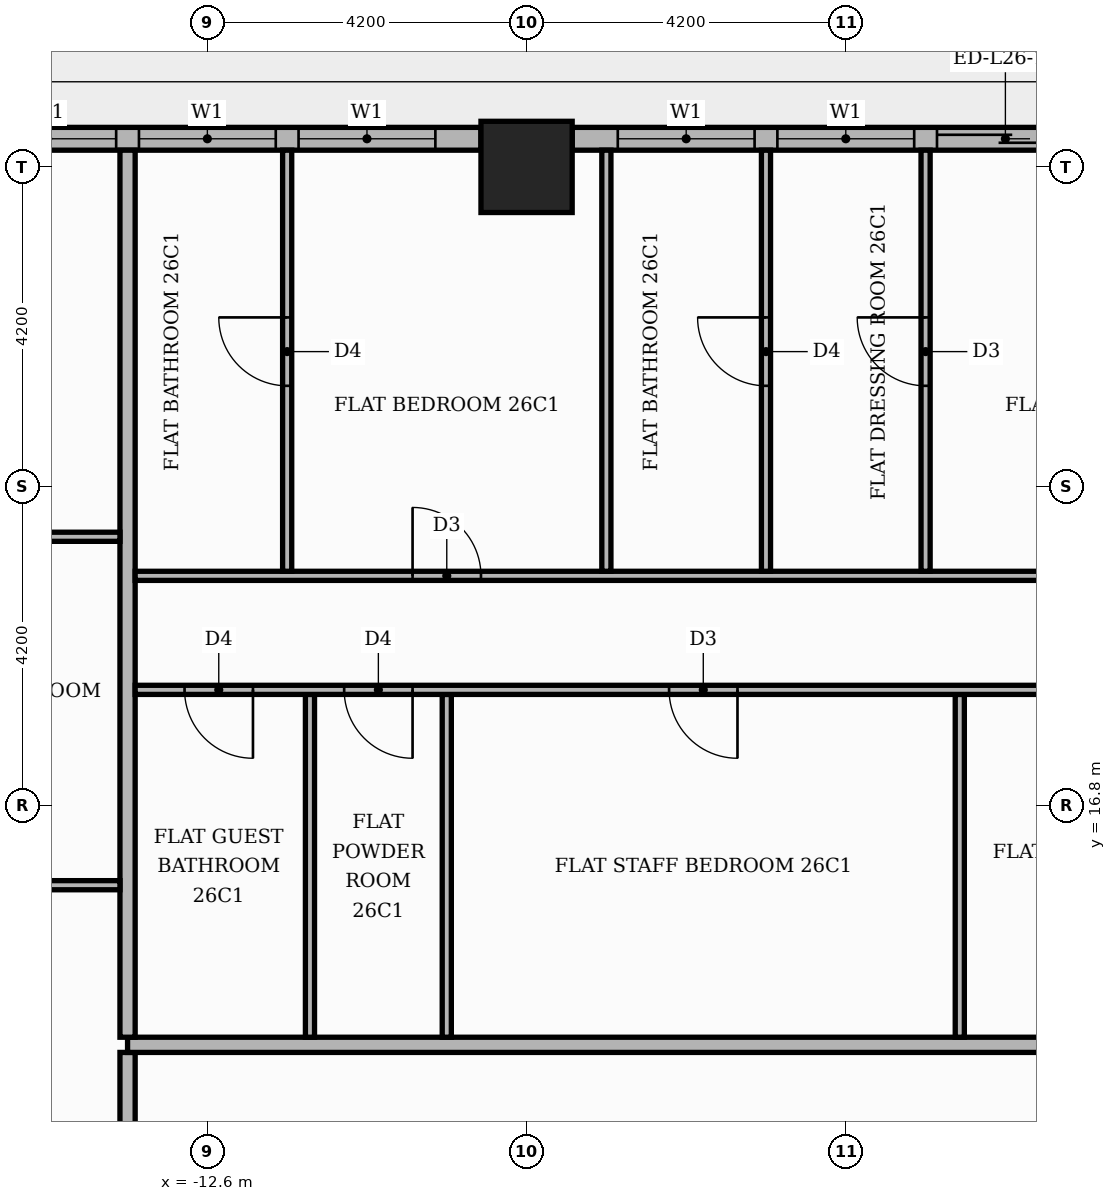
"""IFC4 building model, lengths in metres.
Left out: names, types, materials, properties, quantities, classifications, styles, units other than length and angle.
Written with IfcOpenShell. Run it as: python <this file> out.ifc"""

import sys

from ifc_helpers import new_model, si_unit, direction, frame, frame_2d, origin, origin_2d, place, context, subcontext, project, spatial, rectangle, extrude, element, fill, save


model = new_model("IFC4")
c1 = context("Model", 3, precision=1e-05, world=origin(), true_north=direction((0.0, 1.0)))
c2 = subcontext(c1, "Body", "Model", "MODEL_VIEW")
j1 = project(units=[si_unit("LENGTHUNIT", "METRE"), si_unit("PLANEANGLEUNIT", "RADIAN")], contexts=[c1])
p1 = place(None, origin())
s1 = spatial("IfcSite", under=j1, at=p1, CompositionType="ELEMENT")
p2 = place(p1, origin())
s2 = spatial("IfcBuilding", under=s1, at=p2, CompositionType="ELEMENT")
p3 = place(p2, frame((0.0, 0.0, 110.4)))
s3 = spatial("IfcBuildingStorey", under=s2, at=p3, CompositionType="ELEMENT", Elevation=110.4)
p4 = place(p3, frame((-8.4, 25.2, 0.0), z_axis=(0.0, 0.0, 1.0), x_axis=(1.0, 0.0, 0.0)))
e1 = element("IfcColumn", 1, at=p4, inside=s3, PredefinedType="COLUMN", context=c2, shape_type="SweptSolid", body=[
    extrude(rectangle(XDim=1.2, YDim=1.2, at=origin_2d()), origin(), (0.0, 0.0, 1.0), 3.9),
])
p5 = place(p3, frame((-0.6, 25.57, 0.0), z_axis=(0.0, 0.0, 1.0), x_axis=(-1.0, 0.0, 0.0)))
e2 = element("IfcWall", 2, at=p5, inside=s3, PredefinedType="STANDARD", context=c2, shape_type="SweptSolid", body=[
    extrude(rectangle(XDim=7.2, YDim=0.3, at=frame_2d((3.6, 0.0))), origin(), (0.0, 0.0, 1.0), 3.48),
])
p6 = place(p5, frame((0.6, 0.0, 0.0)))
e3 = element("IfcOpeningElement", 3, at=p6, cuts=e2, PredefinedType="OPENING", context=c2, shape_type="SweptSolid", body=[
    extrude(rectangle(XDim=1.8, YDim=2.4, at=frame_2d((0.9, 1.2))), frame((0.0, 0.16, 0.0), z_axis=(0.0, -1.0, 0.0), x_axis=(1.0, 0.0, 0.0)), (0.0, 0.0, 1.0), 0.32),
])
p7 = place(p5, frame((2.7, 0.0, 0.9)))
e4 = element("IfcOpeningElement", 4, at=p7, cuts=e2, PredefinedType="OPENING", context=c2, shape_type="SweptSolid", body=[
    extrude(rectangle(XDim=1.8, YDim=2.1, at=frame_2d((0.9, 1.05))), frame((0.0, 0.16, 0.0), z_axis=(0.0, -1.0, 0.0), x_axis=(1.0, 0.0, 0.0)), (0.0, 0.0, 1.0), 0.32),
])
p8 = place(p5, frame((4.8, 0.0, 0.9)))
e5 = element("IfcOpeningElement", 5, at=p8, cuts=e2, PredefinedType="OPENING", context=c2, shape_type="SweptSolid", body=[
    extrude(rectangle(XDim=1.8, YDim=2.1, at=frame_2d((0.9, 1.05))), frame((0.0, 0.16, 0.0), z_axis=(0.0, -1.0, 0.0), x_axis=(1.0, 0.0, 0.0)), (0.0, 0.0, 1.0), 0.32),
])
p9 = place(p3, frame((-9.0, 25.57, 0.0), z_axis=(0.0, 0.0, 1.0), x_axis=(-1.0, 0.0, 0.0)))
e6 = element("IfcWall", 6, at=p9, inside=s3, PredefinedType="STANDARD", context=c2, shape_type="SweptSolid", body=[
    extrude(rectangle(XDim=7.2, YDim=0.3, at=frame_2d((3.6, 0.0))), origin(), (0.0, 0.0, 1.0), 3.48),
])
p10 = place(p9, frame((0.6, 0.0, 0.9)))
e7 = element("IfcOpeningElement", 7, at=p10, cuts=e6, PredefinedType="OPENING", context=c2, shape_type="SweptSolid", body=[
    extrude(rectangle(XDim=1.8, YDim=2.1, at=frame_2d((0.9, 1.05))), frame((0.0, 0.16, 0.0), z_axis=(0.0, -1.0, 0.0), x_axis=(1.0, 0.0, 0.0)), (0.0, 0.0, 1.0), 0.32),
])
p11 = place(p9, frame((2.7, 0.0, 0.9)))
e8 = element("IfcOpeningElement", 8, at=p11, cuts=e6, PredefinedType="OPENING", context=c2, shape_type="SweptSolid", body=[
    extrude(rectangle(XDim=1.8, YDim=2.1, at=frame_2d((0.9, 1.05))), frame((0.0, 0.16, 0.0), z_axis=(0.0, -1.0, 0.0), x_axis=(1.0, 0.0, 0.0)), (0.0, 0.0, 1.0), 0.32),
])
p12 = place(p9, frame((4.8, 0.0, 0.9)))
e9 = element("IfcOpeningElement", 9, at=p12, cuts=e6, PredefinedType="OPENING", context=c2, shape_type="SweptSolid", body=[
    extrude(rectangle(XDim=1.8, YDim=2.1, at=frame_2d((0.9, 1.05))), frame((0.0, 0.16, 0.0), z_axis=(0.0, -1.0, 0.0), x_axis=(1.0, 0.0, 0.0)), (0.0, 0.0, 1.0), 0.32),
])
p13 = place(p3, frame((-13.65, 5.35, 0.0), z_axis=(0.0, 0.0, 1.0), x_axis=(0.0, 1.0, 0.0)))
e10 = element("IfcWall", 10, at=p13, inside=s3, PredefinedType="PARTITIONING", context=c2, shape_type="SweptSolid", body=[
    extrude(rectangle(XDim=8.2, YDim=0.2, at=frame_2d((4.1, 0.0))), origin(), (0.0, 0.0, 1.0), 3.48),
])
p14 = place(p13, frame((5.65, 0.0, 0.0)))
e11 = element("IfcOpeningElement", 11, at=p14, cuts=e10, PredefinedType="OPENING", context=c2, shape_type="SweptSolid", body=[
    extrude(rectangle(XDim=1.1, YDim=2.4, at=frame_2d((0.55, 1.2))), frame((0.0, 0.11, 0.0), z_axis=(0.0, -1.0, 0.0), x_axis=(1.0, 0.0, 0.0)), (0.0, 0.0, 1.0), 0.22),
])
p15 = place(p3, frame((-13.65, 13.65, 0.0), z_axis=(0.0, 0.0, 1.0), x_axis=(1.0, 0.0, 0.0)))
e12 = element("IfcWall", 12, at=p15, inside=s3, PredefinedType="PARTITIONING", context=c2, shape_type="SweptSolid", body=[
    extrude(rectangle(XDim=39.07, YDim=0.2, at=frame_2d((19.535, 0.0))), origin(), (0.0, 0.0, 1.0), 3.48),
])
p16 = place(p15, frame((23.6, 0.0, 0.0)))
e13 = element("IfcOpeningElement", 13, at=p16, cuts=e12, PredefinedType="OPENING", context=c2, shape_type="SweptSolid", body=[
    extrude(rectangle(XDim=1.1, YDim=2.4, at=frame_2d((0.55, 1.2))), frame((0.0, 0.11, 0.0), z_axis=(0.0, -1.0, 0.0), x_axis=(1.0, 0.0, 0.0)), (0.0, 0.0, 1.0), 0.22),
])
p17 = place(p3, frame((-13.65, 13.75, 0.0), z_axis=(0.0, 0.0, 1.0), x_axis=(0.0, 1.0, 0.0)))
e14 = element("IfcWall", 14, at=p17, inside=s3, PredefinedType="PARTITIONING", context=c2, shape_type="SweptSolid", body=[
    extrude(rectangle(XDim=11.67, YDim=0.2, at=frame_2d((5.835, 0.0))), origin(), (0.0, 0.0, 1.0), 3.48),
])
for number, where, z_axis, x_axis in (
    (15, (-11.25, 13.75, 0.0), (0.0, 0.0, 1.0), (0.0, 1.0, 0.0)),
    (16, (-9.45, 13.75, 0.0), (0.0, 0.0, 1.0), (0.0, 1.0, 0.0)),
    (17, (-2.7, 13.75, 0.0), (0.0, 0.0, 1.0), (0.0, 1.0, 0.0)),
):
    element("IfcWall", number, at=place(p3, frame(where, z_axis=z_axis, x_axis=x_axis)), inside=s3, PredefinedType="PARTITIONING", context=c2, shape_type="SweptSolid", body=[
        extrude(rectangle(XDim=4.51, YDim=0.12, at=frame_2d((2.255, 0.0))), origin(), (0.0, 0.0, 1.0), 3.48),
    ])
p18 = place(p3, frame((-20.72, 15.75, 0.0), z_axis=(0.0, 0.0, 1.0), x_axis=(1.0, 0.0, 0.0)))
e18 = element("IfcWall", 18, at=p18, inside=s3, PredefinedType="PARTITIONING", context=c2, shape_type="SweptSolid", body=[
    extrude(rectangle(XDim=6.97, YDim=0.12, at=frame_2d((3.485, 0.0))), origin(), (0.0, 0.0, 1.0), 3.48),
])
p19 = place(p18, frame((3.035, 0.0, 0.0)))
e19 = element("IfcOpeningElement", 19, at=p19, cuts=e18, PredefinedType="OPENING", context=c2, shape_type="SweptSolid", body=[
    extrude(rectangle(XDim=1.0, YDim=2.1, at=frame_2d((0.5, 1.05))), frame((0.0, 0.07, 0.0), z_axis=(0.0, -1.0, 0.0), x_axis=(1.0, 0.0, 0.0)), (0.0, 0.0, 1.0), 0.14),
])
p20 = place(p3, frame((-13.55, 18.32, 0.0), z_axis=(0.0, 0.0, 1.0), x_axis=(1.0, 0.0, 0.0)))
e20 = element("IfcWall", 20, at=p20, inside=s3, PredefinedType="PARTITIONING", context=c2, shape_type="SweptSolid", body=[
    extrude(rectangle(XDim=20.9, YDim=0.12, at=frame_2d((10.45, 0.0))), origin(), (0.0, 0.0, 1.0), 3.48),
])
p21 = place(p20, frame((17.525, 0.0, 0.0)))
e21 = element("IfcOpeningElement", 21, at=p21, cuts=e20, PredefinedType="OPENING", context=c2, shape_type="SweptSolid", body=[
    extrude(rectangle(XDim=0.9, YDim=2.1, at=frame_2d((0.45, 1.05))), frame((0.0, 0.07, 0.0), z_axis=(0.0, -1.0, 0.0), x_axis=(1.0, 0.0, 0.0)), (0.0, 0.0, 1.0), 0.14),
])
p22 = place(p20, frame((12.5, 0.0, 0.0)))
e22 = element("IfcOpeningElement", 22, at=p22, cuts=e20, PredefinedType="OPENING", context=c2, shape_type="SweptSolid", body=[
    extrude(rectangle(XDim=0.9, YDim=2.1, at=frame_2d((0.45, 1.05))), frame((0.0, 0.07, 0.0), z_axis=(0.0, -1.0, 0.0), x_axis=(1.0, 0.0, 0.0)), (0.0, 0.0, 1.0), 0.14),
])
p23 = place(p20, frame((7.025, 0.0, 0.0)))
e23 = element("IfcOpeningElement", 23, at=p23, cuts=e20, PredefinedType="OPENING", context=c2, shape_type="SweptSolid", body=[
    extrude(rectangle(XDim=0.9, YDim=2.1, at=frame_2d((0.45, 1.05))), frame((0.0, 0.07, 0.0), z_axis=(0.0, -1.0, 0.0), x_axis=(1.0, 0.0, 0.0)), (0.0, 0.0, 1.0), 0.14),
])
p24 = place(p20, frame((2.75, 0.0, 0.0)))
e24 = element("IfcOpeningElement", 24, at=p24, cuts=e20, PredefinedType="OPENING", context=c2, shape_type="SweptSolid", body=[
    extrude(rectangle(XDim=0.9, YDim=2.1, at=frame_2d((0.45, 1.05))), frame((0.0, 0.07, 0.0), z_axis=(0.0, -1.0, 0.0), x_axis=(1.0, 0.0, 0.0)), (0.0, 0.0, 1.0), 0.14),
])
p25 = place(p20, frame((0.65, 0.0, 0.0)))
e25 = element("IfcOpeningElement", 25, at=p25, cuts=e20, PredefinedType="OPENING", context=c2, shape_type="SweptSolid", body=[
    extrude(rectangle(XDim=0.9, YDim=2.1, at=frame_2d((0.45, 1.05))), frame((0.0, 0.07, 0.0), z_axis=(0.0, -1.0, 0.0), x_axis=(1.0, 0.0, 0.0)), (0.0, 0.0, 1.0), 0.14),
])
p26 = place(p3, frame((-13.55, 19.82, 0.0), z_axis=(0.0, 0.0, 1.0), x_axis=(1.0, 0.0, 0.0)))
e26 = element("IfcWall", 26, at=p26, inside=s3, PredefinedType="PARTITIONING", context=c2, shape_type="SweptSolid", body=[
    extrude(rectangle(XDim=30.95, YDim=0.12, at=frame_2d((15.475, 0.0))), origin(), (0.0, 0.0, 1.0), 3.48),
])
p27 = place(p26, frame((25.65, 0.0, 0.0)))
e27 = element("IfcOpeningElement", 27, at=p27, cuts=e26, PredefinedType="OPENING", context=c2, shape_type="SweptSolid", body=[
    extrude(rectangle(XDim=1.0, YDim=2.1, at=frame_2d((0.5, 1.05))), frame((0.0, 0.07, 0.0), z_axis=(0.0, -1.0, 0.0), x_axis=(1.0, 0.0, 0.0)), (0.0, 0.0, 1.0), 0.14),
])
p28 = place(p26, frame((20.4, 0.0, 0.0)))
e28 = element("IfcOpeningElement", 28, at=p28, cuts=e26, PredefinedType="OPENING", context=c2, shape_type="SweptSolid", body=[
    extrude(rectangle(XDim=1.0, YDim=2.1, at=frame_2d((0.5, 1.05))), frame((0.0, 0.07, 0.0), z_axis=(0.0, -1.0, 0.0), x_axis=(1.0, 0.0, 0.0)), (0.0, 0.0, 1.0), 0.14),
])
p29 = place(p26, frame((13.1, 0.0, 0.0)))
e29 = element("IfcOpeningElement", 29, at=p29, cuts=e26, PredefinedType="OPENING", context=c2, shape_type="SweptSolid", body=[
    extrude(rectangle(XDim=0.9, YDim=2.1, at=frame_2d((0.45, 1.05))), frame((0.0, 0.07, 0.0), z_axis=(0.0, -1.0, 0.0), x_axis=(1.0, 0.0, 0.0)), (0.0, 0.0, 1.0), 0.14),
])
p30 = place(p26, frame((3.65, 0.0, 0.0)))
e30 = element("IfcOpeningElement", 30, at=p30, cuts=e26, PredefinedType="OPENING", context=c2, shape_type="SweptSolid", body=[
    extrude(rectangle(XDim=0.9, YDim=2.1, at=frame_2d((0.45, 1.05))), frame((0.0, 0.07, 0.0), z_axis=(0.0, -1.0, 0.0), x_axis=(1.0, 0.0, 0.0)), (0.0, 0.0, 1.0), 0.14),
])
p31 = place(p3, frame((-11.55, 19.88, 0.0), z_axis=(0.0, 0.0, 1.0), x_axis=(0.0, 1.0, 0.0)))
e31 = element("IfcWall", 31, at=p31, inside=s3, PredefinedType="PARTITIONING", context=c2, shape_type="SweptSolid", body=[
    extrude(rectangle(XDim=5.54, YDim=0.12, at=frame_2d((2.77, 0.0))), origin(), (0.0, 0.0, 1.0), 3.48),
])
p32 = place(p31, frame((2.44, 0.0, 0.0)))
e32 = element("IfcOpeningElement", 32, at=p32, cuts=e31, PredefinedType="OPENING", context=c2, shape_type="SweptSolid", body=[
    extrude(rectangle(XDim=0.9, YDim=2.1, at=frame_2d((0.45, 1.05))), frame((0.0, 0.07, 0.0), z_axis=(0.0, -1.0, 0.0), x_axis=(1.0, 0.0, 0.0)), (0.0, 0.0, 1.0), 0.14),
])
p33 = place(p3, frame((-7.35, 19.88, 0.0), z_axis=(0.0, 0.0, 1.0), x_axis=(0.0, 1.0, 0.0)))
e33 = element("IfcWall", 33, at=p33, inside=s3, PredefinedType="PARTITIONING", context=c2, shape_type="SweptSolid", body=[
    extrude(rectangle(XDim=5.54, YDim=0.12, at=frame_2d((2.77, 0.0))), origin(), (0.0, 0.0, 1.0), 3.48),
])
p34 = place(p3, frame((-5.25, 19.88, 0.0), z_axis=(0.0, 0.0, 1.0), x_axis=(0.0, 1.0, 0.0)))
e34 = element("IfcWall", 34, at=p34, inside=s3, PredefinedType="PARTITIONING", context=c2, shape_type="SweptSolid", body=[
    extrude(rectangle(XDim=5.54, YDim=0.12, at=frame_2d((2.77, 0.0))), origin(), (0.0, 0.0, 1.0), 3.48),
])
p35 = place(p34, frame((2.44, 0.0, 0.0)))
e35 = element("IfcOpeningElement", 35, at=p35, cuts=e34, PredefinedType="OPENING", context=c2, shape_type="SweptSolid", body=[
    extrude(rectangle(XDim=0.9, YDim=2.1, at=frame_2d((0.45, 1.05))), frame((0.0, 0.07, 0.0), z_axis=(0.0, -1.0, 0.0), x_axis=(1.0, 0.0, 0.0)), (0.0, 0.0, 1.0), 0.14),
])
p36 = place(p3, frame((-3.15, 19.88, 0.0), z_axis=(0.0, 0.0, 1.0), x_axis=(0.0, 1.0, 0.0)))
e36 = element("IfcWall", 36, at=p36, inside=s3, PredefinedType="PARTITIONING", context=c2, shape_type="SweptSolid", body=[
    extrude(rectangle(XDim=5.54, YDim=0.12, at=frame_2d((2.77, 0.0))), origin(), (0.0, 0.0, 1.0), 3.48),
])
p37 = place(p36, frame((2.44, 0.0, 0.0)))
e37 = element("IfcOpeningElement", 37, at=p37, cuts=e36, PredefinedType="OPENING", context=c2, shape_type="SweptSolid", body=[
    extrude(rectangle(XDim=0.9, YDim=2.1, at=frame_2d((0.45, 1.05))), frame((0.0, 0.07, 0.0), z_axis=(0.0, -1.0, 0.0), x_axis=(1.0, 0.0, 0.0)), (0.0, 0.0, 1.0), 0.14),
])
p38 = place(p3, frame((-20.72, 20.334, 0.0), z_axis=(0.0, 0.0, 1.0), x_axis=(1.0, 0.0, 0.0)))
e38 = element("IfcWall", 38, at=p38, inside=s3, PredefinedType="PARTITIONING", context=c2, shape_type="SweptSolid", body=[
    extrude(rectangle(XDim=6.97, YDim=0.12, at=frame_2d((3.485, 0.0))), origin(), (0.0, 0.0, 1.0), 3.48),
])
p39 = place(p38, frame((4.853, 0.0, 0.0)))
e39 = element("IfcOpeningElement", 39, at=p39, cuts=e38, PredefinedType="OPENING", context=c2, shape_type="SweptSolid", body=[
    extrude(rectangle(XDim=0.9, YDim=2.1, at=frame_2d((0.45, 1.05))), frame((0.0, 0.07, 0.0), z_axis=(0.0, -1.0, 0.0), x_axis=(1.0, 0.0, 0.0)), (0.0, 0.0, 1.0), 0.14),
])
p40 = place(p6, origin())
e40 = element("IfcDoor", 40, at=p40, inside=s3, OperationType="SLIDING_TO_LEFT", PredefinedType="DOOR", context=c2, shape_type="SweptSolid", body=[
    extrude(rectangle(XDim=1.8, YDim=2.4, at=frame_2d((0.9, 1.2))), frame((0.0, 0.025, 0.0), z_axis=(0.0, -1.0, 0.0), x_axis=(1.0, 0.0, 0.0)), (0.0, 0.0, 1.0), 0.05),
])
fill(e3, e40)
p41 = place(p7, origin())
e41 = element("IfcWindow", 41, at=p41, inside=s3, PartitioningType="SINGLE_PANEL", PredefinedType="WINDOW", context=c2, shape_type="SweptSolid", body=[
    extrude(rectangle(XDim=1.8, YDim=2.1, at=frame_2d((0.9, 1.05))), frame((0.0, 0.03, 0.0), z_axis=(0.0, -1.0, 0.0), x_axis=(1.0, 0.0, 0.0)), (0.0, 0.0, 1.0), 0.06),
])
fill(e4, e41)
p42 = place(p8, origin())
e42 = element("IfcWindow", 42, at=p42, inside=s3, PartitioningType="SINGLE_PANEL", PredefinedType="WINDOW", context=c2, shape_type="SweptSolid", body=[
    extrude(rectangle(XDim=1.8, YDim=2.1, at=frame_2d((0.9, 1.05))), frame((0.0, 0.03, 0.0), z_axis=(0.0, -1.0, 0.0), x_axis=(1.0, 0.0, 0.0)), (0.0, 0.0, 1.0), 0.06),
])
fill(e5, e42)
p43 = place(p10, origin())
e43 = element("IfcWindow", 43, at=p43, inside=s3, PartitioningType="SINGLE_PANEL", PredefinedType="WINDOW", context=c2, shape_type="SweptSolid", body=[
    extrude(rectangle(XDim=1.8, YDim=2.1, at=frame_2d((0.9, 1.05))), frame((0.0, 0.03, 0.0), z_axis=(0.0, -1.0, 0.0), x_axis=(1.0, 0.0, 0.0)), (0.0, 0.0, 1.0), 0.06),
])
fill(e7, e43)
p44 = place(p11, origin())
e44 = element("IfcWindow", 44, at=p44, inside=s3, PartitioningType="SINGLE_PANEL", PredefinedType="WINDOW", context=c2, shape_type="SweptSolid", body=[
    extrude(rectangle(XDim=1.8, YDim=2.1, at=frame_2d((0.9, 1.05))), frame((0.0, 0.03, 0.0), z_axis=(0.0, -1.0, 0.0), x_axis=(1.0, 0.0, 0.0)), (0.0, 0.0, 1.0), 0.06),
])
fill(e8, e44)
p45 = place(p12, origin())
e45 = element("IfcWindow", 45, at=p45, inside=s3, PartitioningType="SINGLE_PANEL", PredefinedType="WINDOW", context=c2, shape_type="SweptSolid", body=[
    extrude(rectangle(XDim=1.8, YDim=2.1, at=frame_2d((0.9, 1.05))), frame((0.0, 0.03, 0.0), z_axis=(0.0, -1.0, 0.0), x_axis=(1.0, 0.0, 0.0)), (0.0, 0.0, 1.0), 0.06),
])
fill(e9, e45)
p46 = place(p23, frame((0.9, 0.0, 0.0), z_axis=(0.0, 0.0, 1.0), x_axis=(-1.0, 0.0, 0.0)))
e46 = element("IfcDoor", 46, at=p46, inside=s3, OperationType="SINGLE_SWING_RIGHT", PredefinedType="DOOR", context=c2, shape_type="SweptSolid", body=[
    extrude(rectangle(XDim=0.9, YDim=2.1, at=frame_2d((0.45, 1.05))), frame((0.0, 0.025, 0.0), z_axis=(0.0, -1.0, 0.0), x_axis=(1.0, 0.0, 0.0)), (0.0, 0.0, 1.0), 0.05),
])
fill(e23, e46)
p47 = place(p24, frame((0.9, 0.0, 0.0), z_axis=(0.0, 0.0, 1.0), x_axis=(-1.0, 0.0, 0.0)))
e47 = element("IfcDoor", 47, at=p47, inside=s3, OperationType="SINGLE_SWING_RIGHT", PredefinedType="DOOR", context=c2, shape_type="SweptSolid", body=[
    extrude(rectangle(XDim=0.9, YDim=2.1, at=frame_2d((0.45, 1.05))), frame((0.0, 0.025, 0.0), z_axis=(0.0, -1.0, 0.0), x_axis=(1.0, 0.0, 0.0)), (0.0, 0.0, 1.0), 0.05),
])
fill(e24, e47)
p48 = place(p25, frame((0.9, 0.0, 0.0), z_axis=(0.0, 0.0, 1.0), x_axis=(-1.0, 0.0, 0.0)))
e48 = element("IfcDoor", 48, at=p48, inside=s3, OperationType="SINGLE_SWING_RIGHT", PredefinedType="DOOR", context=c2, shape_type="SweptSolid", body=[
    extrude(rectangle(XDim=0.9, YDim=2.1, at=frame_2d((0.45, 1.05))), frame((0.0, 0.025, 0.0), z_axis=(0.0, -1.0, 0.0), x_axis=(1.0, 0.0, 0.0)), (0.0, 0.0, 1.0), 0.05),
])
fill(e25, e48)
p49 = place(p37, origin())
e49 = element("IfcDoor", 49, at=p49, inside=s3, OperationType="SINGLE_SWING_RIGHT", PredefinedType="DOOR", context=c2, shape_type="SweptSolid", body=[
    extrude(rectangle(XDim=0.9, YDim=2.1, at=frame_2d((0.45, 1.05))), frame((0.0, 0.025, 0.0), z_axis=(0.0, -1.0, 0.0), x_axis=(1.0, 0.0, 0.0)), (0.0, 0.0, 1.0), 0.05),
])
fill(e37, e49)
p50 = place(p35, origin())
e50 = element("IfcDoor", 50, at=p50, inside=s3, OperationType="SINGLE_SWING_RIGHT", PredefinedType="DOOR", context=c2, shape_type="SweptSolid", body=[
    extrude(rectangle(XDim=0.9, YDim=2.1, at=frame_2d((0.45, 1.05))), frame((0.0, 0.025, 0.0), z_axis=(0.0, -1.0, 0.0), x_axis=(1.0, 0.0, 0.0)), (0.0, 0.0, 1.0), 0.05),
])
fill(e35, e50)
p51 = place(p30, origin())
e51 = element("IfcDoor", 51, at=p51, inside=s3, OperationType="SINGLE_SWING_LEFT", PredefinedType="DOOR", context=c2, shape_type="SweptSolid", body=[
    extrude(rectangle(XDim=0.9, YDim=2.1, at=frame_2d((0.45, 1.05))), frame((0.0, 0.025, 0.0), z_axis=(0.0, -1.0, 0.0), x_axis=(1.0, 0.0, 0.0)), (0.0, 0.0, 1.0), 0.05),
])
fill(e30, e51)
p52 = place(p32, origin())
e52 = element("IfcDoor", 52, at=p52, inside=s3, OperationType="SINGLE_SWING_RIGHT", PredefinedType="DOOR", context=c2, shape_type="SweptSolid", body=[
    extrude(rectangle(XDim=0.9, YDim=2.1, at=frame_2d((0.45, 1.05))), frame((0.0, 0.025, 0.0), z_axis=(0.0, -1.0, 0.0), x_axis=(1.0, 0.0, 0.0)), (0.0, 0.0, 1.0), 0.05),
])
fill(e32, e52)
save(model, sys.argv[1])
